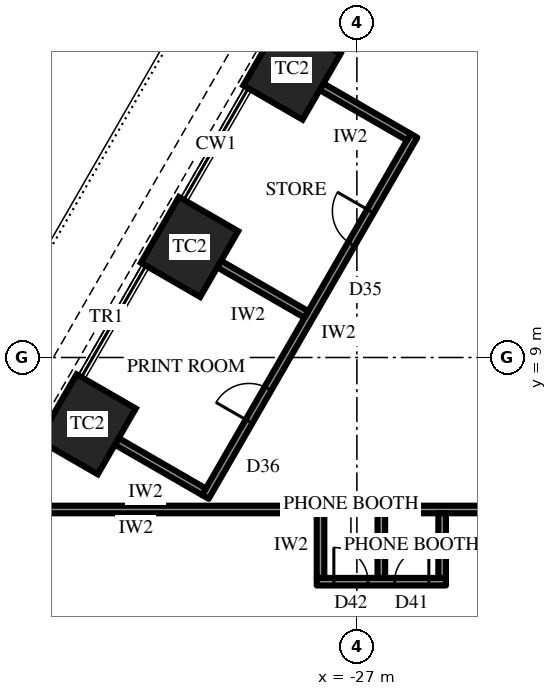
"""IFC4 building model, lengths in metres.
Left out: names, types, materials, properties, quantities, classifications, styles, units other than length and angle.
Written with IfcOpenShell. Run it as: python <this file> out.ifc"""

import sys

from ifc_helpers import new_model, si_unit, direction, frame, frame_2d, origin, origin_2d, place, context, subcontext, project, spatial, rectangle, extrude, element, fill, save


model = new_model("IFC4")
c1 = context("Model", 3, precision=1e-05, world=origin(), true_north=direction((0.0, 1.0)))
c2 = subcontext(c1, "Body", "Model", "MODEL_VIEW")
j1 = project(units=[si_unit("LENGTHUNIT", "METRE"), si_unit("PLANEANGLEUNIT", "RADIAN")], contexts=[c1])
p1 = place(None, origin())
s1 = spatial("IfcSite", under=j1, at=p1, CompositionType="ELEMENT")
p2 = place(p1, origin())
s2 = spatial("IfcBuilding", under=s1, at=p2, CompositionType="ELEMENT")
p3 = place(p2, frame((0.0, 0.0, 44.5)))
s3 = spatial("IfcBuildingStorey", under=s2, at=p3, CompositionType="ELEMENT", Elevation=44.5)
for number, where, z_axis, x_axis in (
    (1, (-28.709, 16.575, 0.0), (0.0, 0.0, 1.0), (-0.5, -0.866, 0.0)),
    (2, (-31.403, 11.908, 0.0), (0.0, 0.0, 1.0), (-0.5, -0.866, 0.0)),
    (3, (-34.097, 7.242, 0.0), (0.0, 0.0, 1.0), (-0.5, -0.866, 0.0)),
):
    element("IfcColumn", number, at=place(p3, frame(where, z_axis=z_axis, x_axis=x_axis)), inside=s3, PredefinedType="COLUMN", context=c2, shape_type="SweptSolid", body=[
        extrude(rectangle(XDim=2.0, YDim=1.8, at=origin_2d()), origin(), (0.0, 0.0, 1.0), 4.2),
    ])
p4 = place(p3, frame((-25.498, 14.837, 0.0), z_axis=(0.0, 0.0, 1.0), x_axis=(-0.499992624997, -0.866029661703, 0.0)))
e4 = element("IfcWall", 4, at=p4, inside=s3, PredefinedType="PARTITIONING", context=c2, shape_type="SweptSolid", body=[
    extrude(rectangle(XDim=10.977, YDim=0.2, at=frame_2d((5.489, 0.0))), origin(), (0.0, 0.0, 1.0), 4.0),
])
p5 = place(p4, frame((2.294, 0.0, 0.0)))
e5 = element("IfcOpeningElement", 5, at=p5, cuts=e4, PredefinedType="OPENING", context=c2, shape_type="SweptSolid", body=[
    extrude(rectangle(XDim=1.0, YDim=2.2, at=frame_2d((0.5, 1.1))), frame((0.0, 0.11, 0.0), z_axis=(0.0, -1.0, 0.0), x_axis=(1.0, 0.0, 0.0)), (0.0, 0.0, 1.0), 0.22),
])
p6 = place(p4, frame((7.683, 0.0, 0.0)))
e6 = element("IfcOpeningElement", 6, at=p6, cuts=e4, PredefinedType="OPENING", context=c2, shape_type="SweptSolid", body=[
    extrude(rectangle(XDim=1.0, YDim=2.2, at=frame_2d((0.5, 1.1))), frame((0.0, 0.11, 0.0), z_axis=(0.0, -1.0, 0.0), x_axis=(1.0, 0.0, 0.0)), (0.0, 0.0, 1.0), 0.22),
])
p7 = place(p3, frame((-25.634, 14.8, 0.0), z_axis=(0.0, 0.0, 1.0), x_axis=(-0.866029095148, 0.499993606316, 0.0)))
e7 = element("IfcWall", 7, at=p7, inside=s3, PredefinedType="PARTITIONING", context=c2, shape_type="SweptSolid", body=[
    extrude(rectangle(XDim=2.65, YDim=0.2, at=frame_2d((1.325, 0.0))), origin(), (0.0, 0.0, 1.0), 4.0),
])
p8 = place(p3, frame((-28.329, 10.133, 0.0), z_axis=(0.0, 0.0, 1.0), x_axis=(-0.866029095148, 0.499993606316, 0.0)))
e8 = element("IfcWall", 8, at=p8, inside=s3, PredefinedType="PARTITIONING", context=c2, shape_type="SweptSolid", body=[
    extrude(rectangle(XDim=2.65, YDim=0.2, at=frame_2d((1.325, 0.0))), origin(), (0.0, 0.0, 1.0), 2.944),
])
p9 = place(p3, frame((-31.023, 5.467, 0.0), z_axis=(0.0, 0.0, 1.0), x_axis=(-0.865989200783, 0.500062700197, 0.0)))
e9 = element("IfcWall", 9, at=p9, inside=s3, PredefinedType="PARTITIONING", context=c2, shape_type="SweptSolid", body=[
    extrude(rectangle(XDim=2.65, YDim=0.2, at=frame_2d((1.325, 0.0))), origin(), (0.0, 0.0, 1.0), 2.944),
])
p10 = place(p3, frame((-21.1, 5.0, 0.0), z_axis=(0.0, 0.0, 1.0), x_axis=(-1.0, 0.0, 0.0)))
e10 = element("IfcWall", 10, at=p10, inside=s3, PredefinedType="PARTITIONING", context=c2, shape_type="SweptSolid", body=[
    extrude(rectangle(XDim=15.019, YDim=0.2, at=frame_2d((7.509, 0.0))), origin(), (0.0, 0.0, 1.0), 4.0),
])
p11 = place(p10, frame((1.002, 0.0, 0.0)))
e11 = element("IfcOpeningElement", 11, at=p11, cuts=e10, PredefinedType="OPENING", context=c2, shape_type="SweptSolid", body=[
    extrude(rectangle(XDim=1.0, YDim=2.2, at=frame_2d((0.5, 1.1))), frame((0.0, 0.11, 0.0), z_axis=(0.0, -1.0, 0.0), x_axis=(1.0, 0.0, 0.0)), (0.0, 0.0, 1.0), 0.22),
])
p12 = place(p3, frame((-24.657, 3.1, 0.0), z_axis=(0.0, 0.0, 1.0), x_axis=(-1.0, 0.0, 0.0)))
e12 = element("IfcWall", 12, at=p12, inside=s3, PredefinedType="PARTITIONING", context=c2, shape_type="SweptSolid", body=[
    extrude(rectangle(XDim=3.4, YDim=0.2, at=frame_2d((1.7, 0.0))), origin(), (0.0, 0.0, 1.0), 4.0),
])
p13 = place(p12, frame((0.45, 0.0, 0.0)))
e13 = element("IfcOpeningElement", 13, at=p13, cuts=e12, PredefinedType="OPENING", context=c2, shape_type="SweptSolid", body=[
    extrude(rectangle(XDim=0.9, YDim=2.2, at=frame_2d((0.45, 1.1))), frame((0.0, 0.11, 0.0), z_axis=(0.0, -1.0, 0.0), x_axis=(1.0, 0.0, 0.0)), (0.0, 0.0, 1.0), 0.22),
])
p14 = place(p12, frame((2.05, 0.0, 0.0)))
e14 = element("IfcOpeningElement", 14, at=p14, cuts=e12, PredefinedType="OPENING", context=c2, shape_type="SweptSolid", body=[
    extrude(rectangle(XDim=0.9, YDim=2.2, at=frame_2d((0.45, 1.1))), frame((0.0, 0.11, 0.0), z_axis=(0.0, -1.0, 0.0), x_axis=(1.0, 0.0, 0.0)), (0.0, 0.0, 1.0), 0.22),
])
for number, where, z_axis, x_axis in (
    (15, (-24.757, 4.9, 0.0), (0.0, 0.0, 1.0), (0.0, -1.0, 0.0)),
    (16, (-26.357, 4.9, 0.0), (0.0, 0.0, 1.0), (0.0, -1.0, 0.0)),
    (17, (-27.957, 4.9, 0.0), (0.0, 0.0, 1.0), (0.0, -1.0, 0.0)),
):
    element("IfcWall", number, at=place(p3, frame(where, z_axis=z_axis, x_axis=x_axis)), inside=s3, PredefinedType="PARTITIONING", context=c2, shape_type="SweptSolid", body=[
        extrude(rectangle(XDim=1.7, YDim=0.2, at=frame_2d((0.85, 0.0))), origin(), (0.0, 0.0, 1.0), 4.0),
    ])
p15 = place(p5, frame((1.0, 0.0, 0.0), z_axis=(0.0, 0.0, 1.0), x_axis=(-1.0, 0.0, 0.0)))
e18 = element("IfcDoor", 18, at=p15, inside=s3, OperationType="SINGLE_SWING_LEFT", PredefinedType="DOOR", context=c2, shape_type="SweptSolid", body=[
    extrude(rectangle(XDim=1.0, YDim=2.2, at=frame_2d((0.5, 1.1))), frame((0.0, 0.025, 0.0), z_axis=(0.0, -1.0, 0.0), x_axis=(1.0, 0.0, 0.0)), (0.0, 0.0, 1.0), 0.05),
])
fill(e5, e18)
p16 = place(p6, frame((1.0, 0.0, 0.0), z_axis=(0.0, 0.0, 1.0), x_axis=(-1.0, 0.0, 0.0)))
e19 = element("IfcDoor", 19, at=p16, inside=s3, OperationType="SINGLE_SWING_RIGHT", PredefinedType="DOOR", context=c2, shape_type="SweptSolid", body=[
    extrude(rectangle(XDim=1.0, YDim=2.2, at=frame_2d((0.5, 1.1))), frame((0.0, 0.025, 0.0), z_axis=(0.0, -1.0, 0.0), x_axis=(1.0, 0.0, 0.0)), (0.0, 0.0, 1.0), 0.05),
])
fill(e6, e19)
p17 = place(p13, frame((0.9, 0.0, 0.0), z_axis=(0.0, 0.0, 1.0), x_axis=(-1.0, 0.0, 0.0)))
e20 = element("IfcDoor", 20, at=p17, inside=s3, OperationType="SINGLE_SWING_LEFT", PredefinedType="DOOR", context=c2, shape_type="SweptSolid", body=[
    extrude(rectangle(XDim=0.9, YDim=2.2, at=frame_2d((0.45, 1.1))), frame((0.0, 0.025, 0.0), z_axis=(0.0, -1.0, 0.0), x_axis=(1.0, 0.0, 0.0)), (0.0, 0.0, 1.0), 0.05),
])
fill(e13, e20)
p18 = place(p14, frame((0.9, 0.0, 0.0), z_axis=(0.0, 0.0, 1.0), x_axis=(-1.0, 0.0, 0.0)))
e21 = element("IfcDoor", 21, at=p18, inside=s3, OperationType="SINGLE_SWING_RIGHT", PredefinedType="DOOR", context=c2, shape_type="SweptSolid", body=[
    extrude(rectangle(XDim=0.9, YDim=2.2, at=frame_2d((0.45, 1.1))), frame((0.0, 0.025, 0.0), z_axis=(0.0, -1.0, 0.0), x_axis=(1.0, 0.0, 0.0)), (0.0, 0.0, 1.0), 0.05),
])
fill(e14, e21)
save(model, sys.argv[1])
